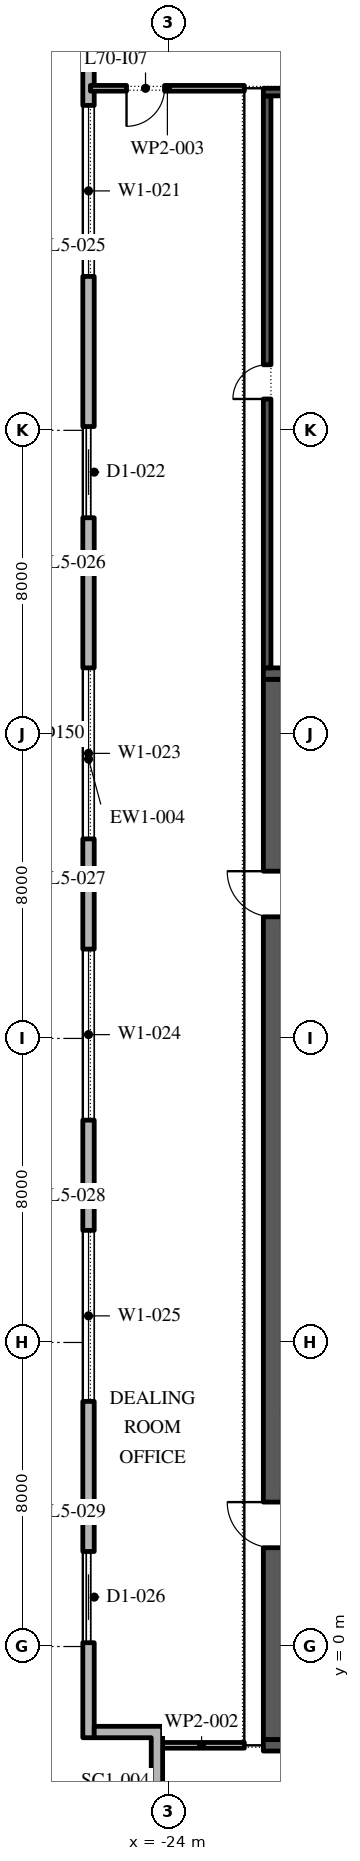
"""IFC4 building model, lengths in metres.
Left out: names, types, materials, properties, quantities, classifications, styles, units other than length and angle.
Written with IfcOpenShell. Run it as: python <this file> out.ifc"""

import sys

from ifc_helpers import new_model, si_unit, direction, frame, frame_2d, origin, place, context, subcontext, project, spatial, polyline, rectangle, outline, extrude, element, fill, save


model = new_model("IFC4")
c1 = context("Model", 3, precision=1e-05, world=origin(), true_north=direction((0.0, 1.0)))
c2 = subcontext(c1, "Body", "Model", "MODEL_VIEW")
j1 = project(units=[si_unit("LENGTHUNIT", "METRE"), si_unit("PLANEANGLEUNIT", "RADIAN")], contexts=[c1])
p1 = place(None, origin())
s1 = spatial("IfcSite", under=j1, at=p1, CompositionType="ELEMENT")
p2 = place(p1, origin())
s2 = spatial("IfcBuilding", under=s1, at=p2, CompositionType="ELEMENT")
p3 = place(p2, frame((0.0, 0.0, 321.6)))
s3 = spatial("IfcBuildingStorey", under=s2, at=p3, CompositionType="ELEMENT", Elevation=321.6)
p4 = place(p3, frame((-26.1, 49.1, 0.0), z_axis=(0.0, 0.0, 1.0), x_axis=(0.0, -1.0, 0.0)))
e1 = element("IfcWall", 1, at=p4, inside=s3, PredefinedType="STANDARD", context=c2, shape_type="SweptSolid", body=[
    extrude(rectangle(XDim=51.5, YDim=0.3, at=frame_2d((25.75, 0.0))), origin(), (0.0, 0.0, 1.0), 4.0),
])
p5 = place(p4, frame((1.3, 0.0, 0.45)))
e2 = element("IfcOpeningElement", 2, at=p5, cuts=e1, PredefinedType="OPENING", context=c2, shape_type="SweptSolid", body=[
    extrude(rectangle(XDim=4.5, YDim=3.05, at=frame_2d((2.25, 1.525))), frame((0.0, 0.16, 0.0), z_axis=(0.0, -1.0, 0.0), x_axis=(1.0, 0.0, 0.0)), (0.0, 0.0, 1.0), 0.32),
])
p6 = place(p4, frame((8.55, 0.0, 0.45)))
e3 = element("IfcOpeningElement", 3, at=p6, cuts=e1, PredefinedType="OPENING", context=c2, shape_type="SweptSolid", body=[
    extrude(rectangle(XDim=4.5, YDim=3.05, at=frame_2d((2.25, 1.525))), frame((0.0, 0.16, 0.0), z_axis=(0.0, -1.0, 0.0), x_axis=(1.0, 0.0, 0.0)), (0.0, 0.0, 1.0), 0.32),
])
p7 = place(p4, frame((17.0, 0.0, 0.0)))
e4 = element("IfcOpeningElement", 4, at=p7, cuts=e1, PredefinedType="OPENING", context=c2, shape_type="SweptSolid", body=[
    extrude(rectangle(XDim=2.4, YDim=3.5, at=frame_2d((1.2, 1.75))), frame((0.0, 0.16, 0.0), z_axis=(0.0, -1.0, 0.0), x_axis=(1.0, 0.0, 0.0)), (0.0, 0.0, 1.0), 0.32),
])
p8 = place(p4, frame((23.35, 0.0, 0.45)))
e5 = element("IfcOpeningElement", 5, at=p8, cuts=e1, PredefinedType="OPENING", context=c2, shape_type="SweptSolid", body=[
    extrude(rectangle(XDim=4.5, YDim=3.05, at=frame_2d((2.25, 1.525))), frame((0.0, 0.16, 0.0), z_axis=(0.0, -1.0, 0.0), x_axis=(1.0, 0.0, 0.0)), (0.0, 0.0, 1.0), 0.32),
])
p9 = place(p4, frame((30.75, 0.0, 0.45)))
e6 = element("IfcOpeningElement", 6, at=p9, cuts=e1, PredefinedType="OPENING", context=c2, shape_type="SweptSolid", body=[
    extrude(rectangle(XDim=4.5, YDim=3.05, at=frame_2d((2.25, 1.525))), frame((0.0, 0.16, 0.0), z_axis=(0.0, -1.0, 0.0), x_axis=(1.0, 0.0, 0.0)), (0.0, 0.0, 1.0), 0.32),
])
p10 = place(p4, frame((38.15, 0.0, 0.45)))
e7 = element("IfcOpeningElement", 7, at=p10, cuts=e1, PredefinedType="OPENING", context=c2, shape_type="SweptSolid", body=[
    extrude(rectangle(XDim=4.5, YDim=3.05, at=frame_2d((2.25, 1.525))), frame((0.0, 0.16, 0.0), z_axis=(0.0, -1.0, 0.0), x_axis=(1.0, 0.0, 0.0)), (0.0, 0.0, 1.0), 0.32),
])
p11 = place(p4, frame((46.6, 0.0, 0.0)))
e8 = element("IfcOpeningElement", 8, at=p11, cuts=e1, PredefinedType="OPENING", context=c2, shape_type="SweptSolid", body=[
    extrude(rectangle(XDim=2.4, YDim=3.5, at=frame_2d((1.2, 1.75))), frame((0.0, 0.16, 0.0), z_axis=(0.0, -1.0, 0.0), x_axis=(1.0, 0.0, 0.0)), (0.0, 0.0, 1.0), 0.32),
])
p12 = place(p3, origin())
e9 = element("IfcWall", 9, at=p12, inside=s3, PredefinedType="STANDARD", context=c2, shape_type="SweptSolid", body=[
    extrude(outline(polyline([(-22.65, -4.2), (-24.45, -4.2), (-24.45, -2.4), (-25.95, -2.4), (-25.95, -2.1), (-24.15, -2.1), (-24.15, -3.9), (-22.35, -3.9), (-22.35, -6.0), (-22.65, -6.0), (-22.65, -4.2)])), origin(), (0.0, 0.0, 1.0), 4.0),
])
p13 = place(p3, frame((-21.25, -2.45, 0.0), z_axis=(0.0, 0.0, 1.0), x_axis=(0.0, 1.0, 0.0)))
e10 = element("IfcWall", 10, at=p13, inside=s3, PredefinedType="SHEAR", context=c2, shape_type="SweptSolid", body=[
    extrude(rectangle(XDim=27.9, YDim=0.5, at=frame_2d((13.95, 0.0))), origin(), (0.0, 0.0, 1.0), 4.0),
])
p14 = place(p13, frame((5.05, 0.0, 0.0)))
e11 = element("IfcOpeningElement", 11, at=p14, cuts=e10, PredefinedType="OPENING", context=c2, shape_type="SweptSolid", body=[
    extrude(rectangle(XDim=1.2, YDim=2.1, at=frame_2d((0.6, 1.05))), frame((0.0, 0.26, 0.0), z_axis=(0.0, -1.0, 0.0), x_axis=(1.0, 0.0, 0.0)), (0.0, 0.0, 1.0), 0.52),
])
p15 = place(p13, frame((21.65, 0.0, 0.0)))
e12 = element("IfcOpeningElement", 12, at=p15, cuts=e10, PredefinedType="OPENING", context=c2, shape_type="SweptSolid", body=[
    extrude(rectangle(XDim=1.2, YDim=2.1, at=frame_2d((0.6, 1.05))), frame((0.0, 0.26, 0.0), z_axis=(0.0, -1.0, 0.0), x_axis=(1.0, 0.0, 0.0)), (0.0, 0.0, 1.0), 0.52),
])
for number, where, z_axis, x_axis in (
    (13, (-21.5, -2.6, 0.0), (0.0, 0.0, 1.0), (1.0, 0.0, 0.0)),
    (14, (-21.5, 25.6, 0.0), (0.0, 0.0, 1.0), (1.0, 0.0, 0.0)),
):
    element("IfcWall", number, at=place(p3, frame(where, z_axis=z_axis, x_axis=x_axis)), inside=s3, PredefinedType="SHEAR", context=c2, shape_type="SweptSolid", body=[
        extrude(rectangle(XDim=11.0, YDim=0.3, at=frame_2d((5.5, 0.0))), origin(), (0.0, 0.0, 1.0), 4.0),
    ])
p16 = place(p3, frame((-21.4, 25.75, 0.0), z_axis=(0.0, 0.0, 1.0), x_axis=(0.0, 1.0, 0.0)))
e15 = element("IfcWall", 15, at=p16, inside=s3, PredefinedType="SHEAR", context=c2, shape_type="SweptSolid", body=[
    extrude(rectangle(XDim=15.05, YDim=0.2, at=frame_2d((7.525, 0.0))), origin(), (0.0, 0.0, 1.0), 4.0),
])
p17 = place(p16, frame((7.075, 0.0, 0.0)))
e16 = element("IfcOpeningElement", 16, at=p17, cuts=e15, PredefinedType="OPENING", context=c2, shape_type="SweptSolid", body=[
    extrude(rectangle(XDim=0.9, YDim=2.1, at=frame_2d((0.45, 1.05))), frame((0.0, 0.11, 0.0), z_axis=(0.0, -1.0, 0.0), x_axis=(1.0, 0.0, 0.0)), (0.0, 0.0, 1.0), 0.22),
])
p18 = place(p3, frame((-21.5, 40.9, 0.0), z_axis=(0.0, 0.0, 1.0), x_axis=(1.0, 0.0, 0.0)))
e17 = element("IfcWall", 17, at=p18, inside=s3, PredefinedType="SHEAR", context=c2, shape_type="SweptSolid", body=[
    extrude(rectangle(XDim=11.0, YDim=0.2, at=frame_2d((5.5, 0.0))), origin(), (0.0, 0.0, 1.0), 4.0),
])
p19 = place(p3, frame((-24.25, -2.6, 0.0), z_axis=(0.0, 0.0, 1.0), x_axis=(1.0, 0.0, 0.0)))
e18 = element("IfcWall", 18, at=p19, inside=s3, PredefinedType="PARTITIONING", context=c2, shape_type="SweptSolid", body=[
    extrude(rectangle(XDim=2.25, YDim=0.15, at=frame_2d((1.125, 0.0))), origin(), (0.0, 0.0, 1.0), 4.0),
])
p20 = place(p3, frame((-22.0, 41.0, 0.0), z_axis=(0.0, 0.0, 1.0), x_axis=(-1.0, 0.0, 0.0)))
e19 = element("IfcWall", 19, at=p20, inside=s3, PredefinedType="PARTITIONING", context=c2, shape_type="SweptSolid", body=[
    extrude(rectangle(XDim=4.05, YDim=0.15, at=frame_2d((2.025, 0.0))), origin(), (0.0, 0.0, 1.0), 4.0),
])
p21 = place(p20, frame((2.1, 0.0, 0.0)))
e20 = element("IfcOpeningElement", 20, at=p21, cuts=e19, PredefinedType="OPENING", context=c2, shape_type="SweptSolid", body=[
    extrude(rectangle(XDim=1.0, YDim=2.1, at=frame_2d((0.5, 1.05))), frame((0.0, 0.085, 0.0), z_axis=(0.0, -1.0, 0.0), x_axis=(1.0, 0.0, 0.0)), (0.0, 0.0, 1.0), 0.17),
])
p22 = place(p6, origin())
e21 = element("IfcWindow", 21, at=p22, inside=s3, PartitioningType="DOUBLE_PANEL_VERTICAL", PredefinedType="WINDOW", context=c2, shape_type="SweptSolid", body=[
    extrude(rectangle(XDim=4.5, YDim=3.05, at=frame_2d((2.25, 1.525))), frame((0.0, 0.03, 0.0), z_axis=(0.0, -1.0, 0.0), x_axis=(1.0, 0.0, 0.0)), (0.0, 0.0, 1.0), 0.06),
])
fill(e3, e21)
p23 = place(p7, origin())
e22 = element("IfcDoor", 22, at=p23, inside=s3, OperationType="DOUBLE_DOOR_SLIDING", PredefinedType="DOOR", context=c2, shape_type="SweptSolid", body=[
    extrude(rectangle(XDim=2.4, YDim=3.5, at=frame_2d((1.2, 1.75))), frame((0.0, 0.025, 0.0), z_axis=(0.0, -1.0, 0.0), x_axis=(1.0, 0.0, 0.0)), (0.0, 0.0, 1.0), 0.05),
])
fill(e4, e22)
p24 = place(p8, origin())
e23 = element("IfcWindow", 23, at=p24, inside=s3, PartitioningType="DOUBLE_PANEL_VERTICAL", PredefinedType="WINDOW", context=c2, shape_type="SweptSolid", body=[
    extrude(rectangle(XDim=4.5, YDim=3.05, at=frame_2d((2.25, 1.525))), frame((0.0, 0.03, 0.0), z_axis=(0.0, -1.0, 0.0), x_axis=(1.0, 0.0, 0.0)), (0.0, 0.0, 1.0), 0.06),
])
fill(e5, e23)
p25 = place(p9, origin())
e24 = element("IfcWindow", 24, at=p25, inside=s3, PartitioningType="DOUBLE_PANEL_VERTICAL", PredefinedType="WINDOW", context=c2, shape_type="SweptSolid", body=[
    extrude(rectangle(XDim=4.5, YDim=3.05, at=frame_2d((2.25, 1.525))), frame((0.0, 0.03, 0.0), z_axis=(0.0, -1.0, 0.0), x_axis=(1.0, 0.0, 0.0)), (0.0, 0.0, 1.0), 0.06),
])
fill(e6, e24)
p26 = place(p10, origin())
e25 = element("IfcWindow", 25, at=p26, inside=s3, PartitioningType="DOUBLE_PANEL_VERTICAL", PredefinedType="WINDOW", context=c2, shape_type="SweptSolid", body=[
    extrude(rectangle(XDim=4.5, YDim=3.05, at=frame_2d((2.25, 1.525))), frame((0.0, 0.03, 0.0), z_axis=(0.0, -1.0, 0.0), x_axis=(1.0, 0.0, 0.0)), (0.0, 0.0, 1.0), 0.06),
])
fill(e7, e25)
p27 = place(p11, origin())
e26 = element("IfcDoor", 26, at=p27, inside=s3, OperationType="DOUBLE_DOOR_SLIDING", PredefinedType="DOOR", context=c2, shape_type="SweptSolid", body=[
    extrude(rectangle(XDim=2.4, YDim=3.5, at=frame_2d((1.2, 1.75))), frame((0.0, 0.025, 0.0), z_axis=(0.0, -1.0, 0.0), x_axis=(1.0, 0.0, 0.0)), (0.0, 0.0, 1.0), 0.05),
])
fill(e8, e26)
p28 = place(p14, origin())
e27 = element("IfcDoor", 27, at=p28, inside=s3, OperationType="SINGLE_SWING_LEFT", PredefinedType="DOOR", context=c2, shape_type="SweptSolid", body=[
    extrude(rectangle(XDim=1.2, YDim=2.1, at=frame_2d((0.6, 1.05))), frame((0.0, 0.025, 0.0), z_axis=(0.0, -1.0, 0.0), x_axis=(1.0, 0.0, 0.0)), (0.0, 0.0, 1.0), 0.05),
])
fill(e11, e27)
p29 = place(p15, origin())
e28 = element("IfcDoor", 28, at=p29, inside=s3, OperationType="SINGLE_SWING_LEFT", PredefinedType="DOOR", context=c2, shape_type="SweptSolid", body=[
    extrude(rectangle(XDim=1.2, YDim=2.1, at=frame_2d((0.6, 1.05))), frame((0.0, 0.025, 0.0), z_axis=(0.0, -1.0, 0.0), x_axis=(1.0, 0.0, 0.0)), (0.0, 0.0, 1.0), 0.05),
])
fill(e12, e28)
p30 = place(p17, origin())
e29 = element("IfcDoor", 29, at=p30, inside=s3, OperationType="SINGLE_SWING_RIGHT", PredefinedType="DOOR", context=c2, shape_type="SweptSolid", body=[
    extrude(rectangle(XDim=0.9, YDim=2.1, at=frame_2d((0.45, 1.05))), frame((0.0, -0.05, 0.0), z_axis=(0.0, -1.0, 0.0), x_axis=(1.0, 0.0, 0.0)), (0.0, 0.0, 1.0), 0.05),
])
fill(e16, e29)
p31 = place(p21, origin())
e30 = element("IfcDoor", 30, at=p31, inside=s3, OperationType="SINGLE_SWING_LEFT", PredefinedType="DOOR", context=c2, shape_type="SweptSolid", body=[
    extrude(rectangle(XDim=1.0, YDim=2.1, at=frame_2d((0.5, 1.05))), frame((0.0, 0.025, 0.0), z_axis=(0.0, -1.0, 0.0), x_axis=(1.0, 0.0, 0.0)), (0.0, 0.0, 1.0), 0.05),
])
fill(e20, e30)
save(model, sys.argv[1])
